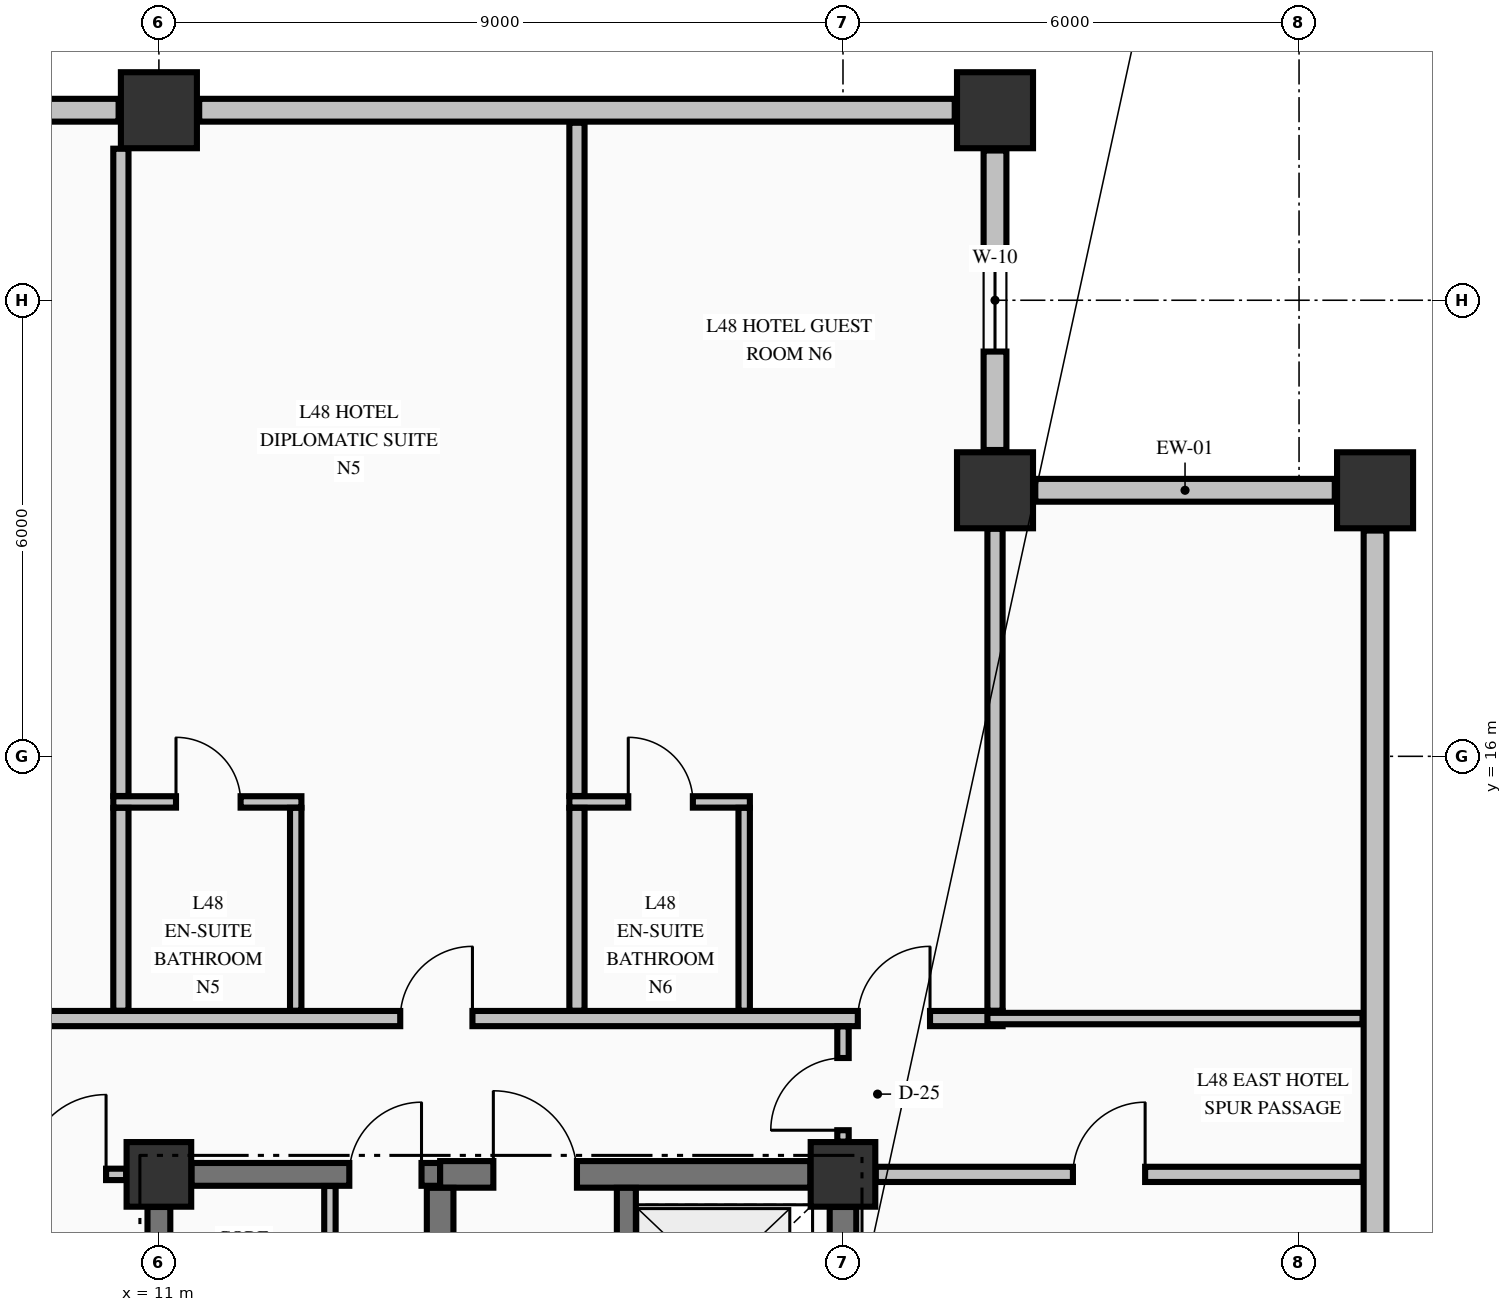
"""IFC4 building model, lengths in metres.
Left out: names, types, materials, properties, quantities, classifications, styles, units other than length and angle.
Written with IfcOpenShell. Run it as: python <this file> out.ifc"""

import sys

from ifc_helpers import new_model, si_unit, direction, frame, frame_2d, origin, origin_2d, place, context, subcontext, project, spatial, rectangle, extrude, element, fill, save


model = new_model("IFC4")
c1 = context("Model", 3, precision=1e-05, world=origin(), true_north=direction((0.0, 1.0)))
c2 = subcontext(c1, "Body", "Model", "MODEL_VIEW")
j1 = project(units=[si_unit("LENGTHUNIT", "METRE"), si_unit("PLANEANGLEUNIT", "RADIAN")], contexts=[c1])
p1 = place(None, origin())
s1 = spatial("IfcSite", under=j1, at=p1, CompositionType="ELEMENT")
p2 = place(p1, origin())
s2 = spatial("IfcBuilding", under=s1, at=p2, CompositionType="ELEMENT")
p3 = place(p2, frame((0.0, 0.0, 186.46)))
s3 = spatial("IfcBuildingStorey", under=s2, at=p3, CompositionType="ELEMENT", Elevation=186.46)
for number, where, z_axis, x_axis in (
    (1, (11.0, 24.5, -0.425), (0.0, 0.0, 1.0), (1.0, 0.0, 0.0)),
    (2, (22.0, 24.5, -0.425), (0.0, 0.0, 1.0), (1.0, 0.0, 0.0)),
    (3, (27.0, 19.5, -0.425), (0.0, 0.0, 1.0), (1.0, 0.0, 0.0)),
    (4, (22.0, 19.5, -0.425), (0.0, 0.0, 1.0), (1.0, 0.0, 0.0)),
):
    element("IfcColumn", number, at=place(p3, frame(where, z_axis=z_axis, x_axis=x_axis)), inside=s3, PredefinedType="COLUMN", context=c2, shape_type="SweptSolid", body=[
        extrude(rectangle(XDim=1.0, YDim=1.0, at=origin_2d()), origin(), (0.0, 0.0, 1.0), 5.0),
    ])
for number, where, z_axis, x_axis in (
    (5, (11.0, 10.5, -0.425), (0.0, 0.0, 1.0), (1.0, 0.0, 0.0)),
    (6, (20.0, 10.5, -0.425), (0.0, 0.0, 1.0), (1.0, 0.0, 0.0)),
):
    element("IfcColumn", number, at=place(p3, frame(where, z_axis=z_axis, x_axis=x_axis)), inside=s3, PredefinedType="COLUMN", context=c2, shape_type="SweptSolid", body=[
        extrude(rectangle(XDim=0.85, YDim=0.85, at=origin_2d()), origin(), (0.0, 0.0, 1.0), 5.0),
    ])
p4 = place(p3, frame((26.47, 19.5, 0.0), z_axis=(0.0, 0.0, 1.0), x_axis=(-1.0, 0.0, 0.0)))
e7 = element("IfcWall", 7, at=p4, inside=s3, PredefinedType="STANDARD", context=c2, shape_type="SweptSolid", body=[
    extrude(rectangle(XDim=3.94, YDim=0.3, at=frame_2d((1.97, 0.0))), origin(), (0.0, 0.0, 1.0), 2.167),
])
p5 = place(p3, frame((22.0, 20.03, 0.0), z_axis=(0.0, 0.0, 1.0), x_axis=(0.0, 1.0, 0.0)))
e8 = element("IfcWall", 8, at=p5, inside=s3, PredefinedType="STANDARD", context=c2, shape_type="SweptSolid", body=[
    extrude(rectangle(XDim=3.94, YDim=0.3, at=frame_2d((1.97, 0.0))), origin(), (0.0, 0.0, 1.0), 2.767),
])
p6 = place(p5, frame((1.295, 0.0, 0.68)))
e9 = element("IfcOpeningElement", 9, at=p6, cuts=e8, PredefinedType="OPENING", context=c2, shape_type="SweptSolid", body=[
    extrude(rectangle(XDim=1.35, YDim=1.42, at=frame_2d((0.675, 0.71))), frame((0.0, 0.16, 0.0), z_axis=(0.0, -1.0, 0.0), x_axis=(1.0, 0.0, 0.0)), (0.0, 0.0, 1.0), 0.32),
])
for number, where, z_axis, x_axis in (
    (10, (10.47, 24.5, 0.0), (0.0, 0.0, 1.0), (-1.0, 0.0, 0.0)),
    (11, (21.47, 24.5, 0.0), (0.0, 0.0, 1.0), (-1.0, 0.0, 0.0)),
):
    element("IfcWall", number, at=place(p3, frame(where, z_axis=z_axis, x_axis=x_axis)), inside=s3, PredefinedType="STANDARD", context=c2, shape_type="SweptSolid", body=[
        extrude(rectangle(XDim=9.94, YDim=0.3, at=frame_2d((4.97, 0.0))), origin(), (0.0, 0.0, 1.0), 2.167),
    ])
p7 = place(p3, frame((27.0, 9.53, 0.0), z_axis=(0.0, 0.0, 1.0), x_axis=(0.0, 1.0, 0.0)))
e12 = element("IfcWall", 12, at=p7, inside=s3, PredefinedType="STANDARD", context=c2, shape_type="SweptSolid", body=[
    extrude(rectangle(XDim=9.44, YDim=0.3, at=frame_2d((4.72, 0.0))), origin(), (0.0, 0.0, 1.0), 2.167),
])
p8 = place(p3, frame((11.429, 10.5, 0.0), z_axis=(0.0, 0.0, 1.0), x_axis=(1.0, 0.0, 0.0)))
e13 = element("IfcWall", 13, at=p8, inside=s3, PredefinedType="SHEAR", context=c2, shape_type="SweptSolid", body=[
    extrude(rectangle(XDim=3.271, YDim=0.3, at=frame_2d((1.635, 0.0))), origin(), (0.0, 0.0, 1.0), 4.575),
])
p9 = place(p8, frame((2.076, 0.0, 0.0)))
e14 = element("IfcOpeningElement", 14, at=p9, cuts=e13, PredefinedType="OPENING", context=c2, shape_type="SweptSolid", body=[
    extrude(rectangle(XDim=0.95, YDim=2.15, at=frame_2d((0.475, 1.075))), frame((0.0, 0.16, 0.0), z_axis=(0.0, -1.0, 0.0), x_axis=(1.0, 0.0, 0.0)), (0.0, 0.0, 1.0), 0.32),
])
p10 = place(p3, frame((14.7, 10.5, 0.0), z_axis=(0.0, 0.0, 1.0), x_axis=(1.0, 0.0, 0.0)))
e15 = element("IfcWall", 15, at=p10, inside=s3, PredefinedType="SHEAR", context=c2, shape_type="SweptSolid", body=[
    extrude(rectangle(XDim=4.871, YDim=0.35, at=frame_2d((2.436, 0.0))), origin(), (0.0, 0.0, 1.0), 4.575),
])
p11 = place(p10, frame((0.7, 0.0, 0.0)))
e16 = element("IfcOpeningElement", 16, at=p11, cuts=e15, PredefinedType="OPENING", context=c2, shape_type="SweptSolid", body=[
    extrude(rectangle(XDim=1.1, YDim=2.15, at=frame_2d((0.55, 1.075))), frame((0.0, 0.185, 0.0), z_axis=(0.0, -1.0, 0.0), x_axis=(1.0, 0.0, 0.0)), (0.0, 0.0, 1.0), 0.37),
])
p12 = place(p3, frame((-10.569, 10.5, 0.0), z_axis=(0.0, 0.0, 1.0), x_axis=(1.0, 0.0, 0.0)))
e17 = element("IfcWall", 17, at=p12, inside=s3, PredefinedType="PARTITIONING", context=c2, shape_type="SweptSolid", body=[
    extrude(rectangle(XDim=21.138, YDim=0.15, at=frame_2d((10.569, 0.0))), origin(), (0.0, 0.0, 1.0), 4.575),
])
p13 = place(p12, frame((0.264, 0.0, 0.0)))
e18 = element("IfcOpeningElement", 18, at=p13, cuts=e17, PredefinedType="OPENING", context=c2, shape_type="SweptSolid", body=[
    extrude(rectangle(XDim=1.05, YDim=2.15, at=frame_2d((0.525, 1.075))), frame((0.0, 0.085, 0.0), z_axis=(0.0, -1.0, 0.0), x_axis=(1.0, 0.0, 0.0)), (0.0, 0.0, 1.0), 0.17),
])
p14 = place(p12, frame((19.824, 0.0, 0.0)))
e19 = element("IfcOpeningElement", 19, at=p14, cuts=e17, PredefinedType="OPENING", context=c2, shape_type="SweptSolid", body=[
    extrude(rectangle(XDim=1.05, YDim=2.15, at=frame_2d((0.525, 1.075))), frame((0.0, 0.085, 0.0), z_axis=(0.0, -1.0, 0.0), x_axis=(1.0, 0.0, 0.0)), (0.0, 0.0, 1.0), 0.17),
])
p15 = place(p3, frame((20.431, 10.5, 0.0), z_axis=(0.0, 0.0, 1.0), x_axis=(1.0, 0.0, 0.0)))
e20 = element("IfcWall", 20, at=p15, inside=s3, PredefinedType="PARTITIONING", context=c2, shape_type="SweptSolid", body=[
    extrude(rectangle(XDim=6.404, YDim=0.2, at=frame_2d((3.202, 0.0))), origin(), (0.0, 0.0, 1.0), 4.575),
])
p16 = place(p15, frame((2.594, 0.0, 0.0)))
e21 = element("IfcOpeningElement", 21, at=p16, cuts=e20, PredefinedType="OPENING", context=c2, shape_type="SweptSolid", body=[
    extrude(rectangle(XDim=0.95, YDim=2.15, at=frame_2d((0.475, 1.075))), frame((0.0, 0.11, 0.0), z_axis=(0.0, -1.0, 0.0), x_axis=(1.0, 0.0, 0.0)), (0.0, 0.0, 1.0), 0.22),
])
p17 = place(p3, frame((-17.1, 12.55, 0.0), z_axis=(0.0, 0.0, 1.0), x_axis=(1.0, 0.0, 0.0)))
e22 = element("IfcWall", 22, at=p17, inside=s3, PredefinedType="PARTITIONING", context=c2, shape_type="SweptSolid", body=[
    extrude(rectangle(XDim=39.2, YDim=0.2, at=frame_2d((19.6, 0.0))), origin(), (0.0, 0.0, 1.0), 4.575),
])
p18 = place(p17, frame((3.575, 0.0, 0.0)))
e23 = element("IfcOpeningElement", 23, at=p18, cuts=e22, PredefinedType="OPENING", context=c2, shape_type="SweptSolid", body=[
    extrude(rectangle(XDim=0.95, YDim=2.15, at=frame_2d((0.475, 1.075))), frame((0.0, 0.11, 0.0), z_axis=(0.0, -1.0, 0.0), x_axis=(1.0, 0.0, 0.0)), (0.0, 0.0, 1.0), 0.22),
])
p19 = place(p17, frame((13.575, 0.0, 0.0)))
e24 = element("IfcOpeningElement", 24, at=p19, cuts=e22, PredefinedType="OPENING", context=c2, shape_type="SweptSolid", body=[
    extrude(rectangle(XDim=0.95, YDim=2.15, at=frame_2d((0.475, 1.075))), frame((0.0, 0.11, 0.0), z_axis=(0.0, -1.0, 0.0), x_axis=(1.0, 0.0, 0.0)), (0.0, 0.0, 1.0), 0.22),
])
p20 = place(p17, frame((19.475, 0.0, 0.0)))
e25 = element("IfcOpeningElement", 25, at=p20, cuts=e22, PredefinedType="OPENING", context=c2, shape_type="SweptSolid", body=[
    extrude(rectangle(XDim=0.95, YDim=2.15, at=frame_2d((0.475, 1.075))), frame((0.0, 0.11, 0.0), z_axis=(0.0, -1.0, 0.0), x_axis=(1.0, 0.0, 0.0)), (0.0, 0.0, 1.0), 0.22),
])
p21 = place(p17, frame((25.375, 0.0, 0.0)))
e26 = element("IfcOpeningElement", 26, at=p21, cuts=e22, PredefinedType="OPENING", context=c2, shape_type="SweptSolid", body=[
    extrude(rectangle(XDim=0.95, YDim=2.15, at=frame_2d((0.475, 1.075))), frame((0.0, 0.11, 0.0), z_axis=(0.0, -1.0, 0.0), x_axis=(1.0, 0.0, 0.0)), (0.0, 0.0, 1.0), 0.22),
])
p22 = place(p17, frame((31.275, 0.0, 0.0)))
e27 = element("IfcOpeningElement", 27, at=p22, cuts=e22, PredefinedType="OPENING", context=c2, shape_type="SweptSolid", body=[
    extrude(rectangle(XDim=0.95, YDim=2.15, at=frame_2d((0.475, 1.075))), frame((0.0, 0.11, 0.0), z_axis=(0.0, -1.0, 0.0), x_axis=(1.0, 0.0, 0.0)), (0.0, 0.0, 1.0), 0.22),
])
p23 = place(p17, frame((37.295, 0.0, 0.0)))
e28 = element("IfcOpeningElement", 28, at=p23, cuts=e22, PredefinedType="OPENING", context=c2, shape_type="SweptSolid", body=[
    extrude(rectangle(XDim=0.95, YDim=2.15, at=frame_2d((0.475, 1.075))), frame((0.0, 0.11, 0.0), z_axis=(0.0, -1.0, 0.0), x_axis=(1.0, 0.0, 0.0)), (0.0, 0.0, 1.0), 0.22),
])
p24 = place(p3, frame((21.9, 12.55, 0.0), z_axis=(0.0, 0.0, 1.0), x_axis=(1.0, 0.0, 0.0)))
e29 = element("IfcWall", 29, at=p24, inside=s3, PredefinedType="PARTITIONING", context=c2, shape_type="SweptSolid", body=[
    extrude(rectangle(XDim=4.935, YDim=0.15, at=frame_2d((2.468, 0.0))), origin(), (0.0, 0.0, 1.0), 4.575),
])
p25 = place(p3, frame((10.4, 15.4, 0.0), z_axis=(0.0, 0.0, 1.0), x_axis=(1.0, 0.0, 0.0)))
e30 = element("IfcWall", 30, at=p25, inside=s3, PredefinedType="PARTITIONING", context=c2, shape_type="SweptSolid", body=[
    extrude(rectangle(XDim=2.475, YDim=0.15, at=frame_2d((1.238, 0.0))), origin(), (0.0, 0.0, 1.0), 4.575),
])
p26 = place(p25, frame((0.825, 0.0, 0.0)))
e31 = element("IfcOpeningElement", 31, at=p26, cuts=e30, PredefinedType="OPENING", context=c2, shape_type="SweptSolid", body=[
    extrude(rectangle(XDim=0.85, YDim=2.1, at=frame_2d((0.425, 1.05))), frame((0.0, 0.085, 0.0), z_axis=(0.0, -1.0, 0.0), x_axis=(1.0, 0.0, 0.0)), (0.0, 0.0, 1.0), 0.17),
])
p27 = place(p3, frame((16.4, 15.4, 0.0), z_axis=(0.0, 0.0, 1.0), x_axis=(1.0, 0.0, 0.0)))
e32 = element("IfcWall", 32, at=p27, inside=s3, PredefinedType="PARTITIONING", context=c2, shape_type="SweptSolid", body=[
    extrude(rectangle(XDim=2.375, YDim=0.15, at=frame_2d((1.188, 0.0))), origin(), (0.0, 0.0, 1.0), 4.575),
])
p28 = place(p27, frame((0.775, 0.0, 0.0)))
e33 = element("IfcOpeningElement", 33, at=p28, cuts=e32, PredefinedType="OPENING", context=c2, shape_type="SweptSolid", body=[
    extrude(rectangle(XDim=0.85, YDim=2.1, at=frame_2d((0.425, 1.05))), frame((0.0, 0.085, 0.0), z_axis=(0.0, -1.0, 0.0), x_axis=(1.0, 0.0, 0.0)), (0.0, 0.0, 1.0), 0.17),
])
p29 = place(p3, frame((11.0, 5.852, 0.0), z_axis=(0.0, 0.0, 1.0), x_axis=(0.0, 1.0, 0.0)))
e34 = element("IfcWall", 34, at=p29, inside=s3, PredefinedType="SHEAR", context=c2, shape_type="SweptSolid", body=[
    extrude(rectangle(XDim=4.219, YDim=0.3, at=frame_2d((2.109, 0.0))), origin(), (0.0, 0.0, 1.0), 4.575),
])
p30 = place(p3, frame((14.7, 5.852, 0.0), z_axis=(0.0, 0.0, 1.0), x_axis=(0.0, 1.0, 0.0)))
e35 = element("IfcWall", 35, at=p30, inside=s3, PredefinedType="SHEAR", context=c2, shape_type="SweptSolid", body=[
    extrude(rectangle(XDim=4.471, YDim=0.35, at=frame_2d((2.235, 0.0))), origin(), (0.0, 0.0, 1.0), 4.575),
])
p31 = place(p3, frame((17.15, 7.877, 0.0), z_axis=(0.0, 0.0, 1.0), x_axis=(0.0, 1.0, 0.0)))
e36 = element("IfcWall", 36, at=p31, inside=s3, PredefinedType="SOLIDWALL", context=c2, shape_type="SweptSolid", body=[
    extrude(rectangle(XDim=2.446, YDim=0.25, at=frame_2d((1.223, 0.0))), origin(), (0.0, 0.0, 1.0), 4.575),
])
p32 = place(p31, frame((0.698, 0.0, 0.0)))
e37 = element("IfcOpeningElement", 37, at=p32, cuts=e36, PredefinedType="OPENING", context=c2, shape_type="SweptSolid", body=[
    extrude(rectangle(XDim=1.1, YDim=2.2, at=frame_2d((0.55, 1.1))), frame((0.0, 0.135, 0.0), z_axis=(0.0, -1.0, 0.0), x_axis=(1.0, 0.0, 0.0)), (0.0, 0.0, 1.0), 0.27),
])
p33 = place(p3, frame((20.0, 7.877, 0.0), z_axis=(0.0, 0.0, 1.0), x_axis=(0.0, 1.0, 0.0)))
e38 = element("IfcWall", 38, at=p33, inside=s3, PredefinedType="SHEAR", context=c2, shape_type="SweptSolid", body=[
    extrude(rectangle(XDim=2.194, YDim=0.35, at=frame_2d((1.097, 0.0))), origin(), (0.0, 0.0, 1.0), 4.575),
])
p34 = place(p3, frame((10.5, 12.653, 0.0), z_axis=(0.0, 0.0, 1.0), x_axis=(0.0, 1.0, 0.0)))
e39 = element("IfcWall", 39, at=p34, inside=s3, PredefinedType="PARTITIONING", context=c2, shape_type="SweptSolid", body=[
    extrude(rectangle(XDim=2.669, YDim=0.2, at=frame_2d((1.334, 0.0))), origin(), (0.0, 0.0, 1.0), 2.167),
])
p35 = place(p3, frame((10.5, 15.478, 0.0), z_axis=(0.0, 0.0, 1.0), x_axis=(0.0, 1.0, 0.0)))
e40 = element("IfcWall", 40, at=p35, inside=s3, PredefinedType="PARTITIONING", context=c2, shape_type="SweptSolid", body=[
    extrude(rectangle(XDim=8.516, YDim=0.2, at=frame_2d((4.258, 0.0))), origin(), (0.0, 0.0, 1.0), 2.167),
])
p36 = place(p3, frame((12.8, 12.653, 0.0), z_axis=(0.0, 0.0, 1.0), x_axis=(0.0, 1.0, 0.0)))
e41 = element("IfcWall", 41, at=p36, inside=s3, PredefinedType="PARTITIONING", context=c2, shape_type="SweptSolid", body=[
    extrude(rectangle(XDim=2.669, YDim=0.15, at=frame_2d((1.334, 0.0))), origin(), (0.0, 0.0, 1.0), 4.575),
])
p37 = place(p3, frame((13.25, 5.853, 0.0), z_axis=(0.0, 0.0, 1.0), x_axis=(0.0, 1.0, 0.0)))
e42 = element("IfcWall", 42, at=p37, inside=s3, PredefinedType="PARTITIONING", context=c2, shape_type="SweptSolid", body=[
    extrude(rectangle(XDim=4.494, YDim=0.15, at=frame_2d((2.247, 0.0))), origin(), (0.0, 0.0, 1.0), 4.575),
])
p38 = place(p37, frame((1.472, 0.0, 0.0)))
e43 = element("IfcOpeningElement", 43, at=p38, cuts=e42, PredefinedType="OPENING", context=c2, shape_type="SweptSolid", body=[
    extrude(rectangle(XDim=0.95, YDim=2.15, at=frame_2d((0.475, 1.075))), frame((0.0, 0.085, 0.0), z_axis=(0.0, -1.0, 0.0), x_axis=(1.0, 0.0, 0.0)), (0.0, 0.0, 1.0), 0.17),
])
p39 = place(p3, frame((16.5, 12.653, 0.0), z_axis=(0.0, 0.0, 1.0), x_axis=(0.0, 1.0, 0.0)))
e44 = element("IfcWall", 44, at=p39, inside=s3, PredefinedType="PARTITIONING", context=c2, shape_type="SweptSolid", body=[
    extrude(rectangle(XDim=2.669, YDim=0.2, at=frame_2d((1.334, 0.0))), origin(), (0.0, 0.0, 1.0), 4.575),
])
p40 = place(p3, frame((16.5, 15.478, 0.0), z_axis=(0.0, 0.0, 1.0), x_axis=(0.0, 1.0, 0.0)))
e45 = element("IfcWall", 45, at=p40, inside=s3, PredefinedType="PARTITIONING", context=c2, shape_type="SweptSolid", body=[
    extrude(rectangle(XDim=8.857, YDim=0.2, at=frame_2d((4.428, 0.0))), origin(), (0.0, 0.0, 1.0), 2.767),
])
p41 = place(p3, frame((18.7, 12.653, 0.0), z_axis=(0.0, 0.0, 1.0), x_axis=(0.0, 1.0, 0.0)))
e46 = element("IfcWall", 46, at=p41, inside=s3, PredefinedType="PARTITIONING", context=c2, shape_type="SweptSolid", body=[
    extrude(rectangle(XDim=2.669, YDim=0.15, at=frame_2d((1.334, 0.0))), origin(), (0.0, 0.0, 1.0), 4.575),
])
p42 = place(p3, frame((20.0, 10.931, 0.0), z_axis=(0.0, 0.0, 1.0), x_axis=(0.0, 1.0, 0.0)))
e47 = element("IfcWall", 47, at=p42, inside=s3, PredefinedType="PARTITIONING", context=c2, shape_type="SweptSolid", body=[
    extrude(rectangle(XDim=1.516, YDim=0.15, at=frame_2d((0.758, 0.0))), origin(), (0.0, 0.0, 1.0), 3.767),
])
p43 = place(p42, frame((0.15, 0.0, 0.0)))
e48 = element("IfcOpeningElement", 48, at=p43, cuts=e47, PredefinedType="OPENING", context=c2, shape_type="SweptSolid", body=[
    extrude(rectangle(XDim=0.95, YDim=2.02, at=frame_2d((0.475, 1.01))), frame((0.0, 0.085, 0.0), z_axis=(0.0, -1.0, 0.0), x_axis=(1.0, 0.0, 0.0)), (0.0, 0.0, 1.0), 0.17),
])
p44 = place(p3, frame((22.0, 12.653, 0.0), z_axis=(0.0, 0.0, 1.0), x_axis=(0.0, 1.0, 0.0)))
e49 = element("IfcWall", 49, at=p44, inside=s3, PredefinedType="PARTITIONING", context=c2, shape_type="SweptSolid", body=[
    extrude(rectangle(XDim=6.341, YDim=0.2, at=frame_2d((3.17, 0.0))), origin(), (0.0, 0.0, 1.0), 2.167),
])
p45 = place(p6, origin())
e50 = element("IfcWindow", 50, at=p45, inside=s3, PartitioningType="SINGLE_PANEL", PredefinedType="WINDOW", context=c2, shape_type="SweptSolid", body=[
    extrude(rectangle(XDim=1.35, YDim=1.42, at=frame_2d((0.675, 0.71))), frame((0.0, 0.03, 0.0), z_axis=(0.0, -1.0, 0.0), x_axis=(1.0, 0.0, 0.0)), (0.0, 0.0, 1.0), 0.06),
])
fill(e9, e50)
p46 = place(p9, origin())
e51 = element("IfcDoor", 51, at=p46, inside=s3, OperationType="SINGLE_SWING_RIGHT", PredefinedType="DOOR", context=c2, shape_type="SweptSolid", body=[
    extrude(rectangle(XDim=0.95, YDim=2.15, at=frame_2d((0.475, 1.075))), frame((0.0, 0.025, 0.0), z_axis=(0.0, -1.0, 0.0), x_axis=(1.0, 0.0, 0.0)), (0.0, 0.0, 1.0), 0.05),
])
fill(e14, e51)
p47 = place(p11, origin())
e52 = element("IfcDoor", 52, at=p47, inside=s3, OperationType="SINGLE_SWING_LEFT", PredefinedType="DOOR", context=c2, shape_type="SweptSolid", body=[
    extrude(rectangle(XDim=1.1, YDim=2.15, at=frame_2d((0.55, 1.075))), frame((0.0, 0.025, 0.0), z_axis=(0.0, -1.0, 0.0), x_axis=(1.0, 0.0, 0.0)), (0.0, 0.0, 1.0), 0.05),
])
fill(e16, e52)
p48 = place(p14, origin())
e53 = element("IfcDoor", 53, at=p48, inside=s3, OperationType="SINGLE_SWING_RIGHT", PredefinedType="DOOR", context=c2, shape_type="SweptSolid", body=[
    extrude(rectangle(XDim=1.05, YDim=2.15, at=frame_2d((0.525, 1.075))), frame((0.0, 0.025, 0.0), z_axis=(0.0, -1.0, 0.0), x_axis=(1.0, 0.0, 0.0)), (0.0, 0.0, 1.0), 0.05),
])
fill(e19, e53)
p49 = place(p22, origin())
e54 = element("IfcDoor", 54, at=p49, inside=s3, OperationType="SINGLE_SWING_RIGHT", PredefinedType="DOOR", context=c2, shape_type="SweptSolid", body=[
    extrude(rectangle(XDim=0.95, YDim=2.15, at=frame_2d((0.475, 1.075))), frame((0.0, 0.025, 0.0), z_axis=(0.0, -1.0, 0.0), x_axis=(1.0, 0.0, 0.0)), (0.0, 0.0, 1.0), 0.05),
])
fill(e27, e54)
p50 = place(p26, origin())
e55 = element("IfcDoor", 55, at=p50, inside=s3, OperationType="SINGLE_SWING_LEFT", PredefinedType="DOOR", context=c2, shape_type="SweptSolid", body=[
    extrude(rectangle(XDim=0.85, YDim=2.1, at=frame_2d((0.425, 1.05))), frame((0.0, 0.025, 0.0), z_axis=(0.0, -1.0, 0.0), x_axis=(1.0, 0.0, 0.0)), (0.0, 0.0, 1.0), 0.05),
])
fill(e31, e55)
p51 = place(p23, origin())
e56 = element("IfcDoor", 56, at=p51, inside=s3, OperationType="SINGLE_SWING_RIGHT", PredefinedType="DOOR", context=c2, shape_type="SweptSolid", body=[
    extrude(rectangle(XDim=0.95, YDim=2.15, at=frame_2d((0.475, 1.075))), frame((0.0, 0.025, 0.0), z_axis=(0.0, -1.0, 0.0), x_axis=(1.0, 0.0, 0.0)), (0.0, 0.0, 1.0), 0.05),
])
fill(e28, e56)
p52 = place(p28, origin())
e57 = element("IfcDoor", 57, at=p52, inside=s3, OperationType="SINGLE_SWING_LEFT", PredefinedType="DOOR", context=c2, shape_type="SweptSolid", body=[
    extrude(rectangle(XDim=0.85, YDim=2.1, at=frame_2d((0.425, 1.05))), frame((0.0, 0.025, 0.0), z_axis=(0.0, -1.0, 0.0), x_axis=(1.0, 0.0, 0.0)), (0.0, 0.0, 1.0), 0.05),
])
fill(e33, e57)
p53 = place(p43, origin())
e58 = element("IfcDoor", 58, at=p53, inside=s3, OperationType="SINGLE_SWING_LEFT", PredefinedType="DOOR", context=c2, shape_type="SweptSolid", body=[
    extrude(rectangle(XDim=0.95, YDim=2.02, at=frame_2d((0.475, 1.01))), frame((0.0, 0.025, 0.0), z_axis=(0.0, -1.0, 0.0), x_axis=(1.0, 0.0, 0.0)), (0.0, 0.0, 1.0), 0.05),
])
fill(e48, e58)
p54 = place(p16, origin())
e59 = element("IfcDoor", 59, at=p54, inside=s3, OperationType="SINGLE_SWING_RIGHT", PredefinedType="DOOR", context=c2, shape_type="SweptSolid", body=[
    extrude(rectangle(XDim=0.95, YDim=2.15, at=frame_2d((0.475, 1.075))), frame((0.0, 0.025, 0.0), z_axis=(0.0, -1.0, 0.0), x_axis=(1.0, 0.0, 0.0)), (0.0, 0.0, 1.0), 0.05),
])
fill(e21, e59)
save(model, sys.argv[1])
